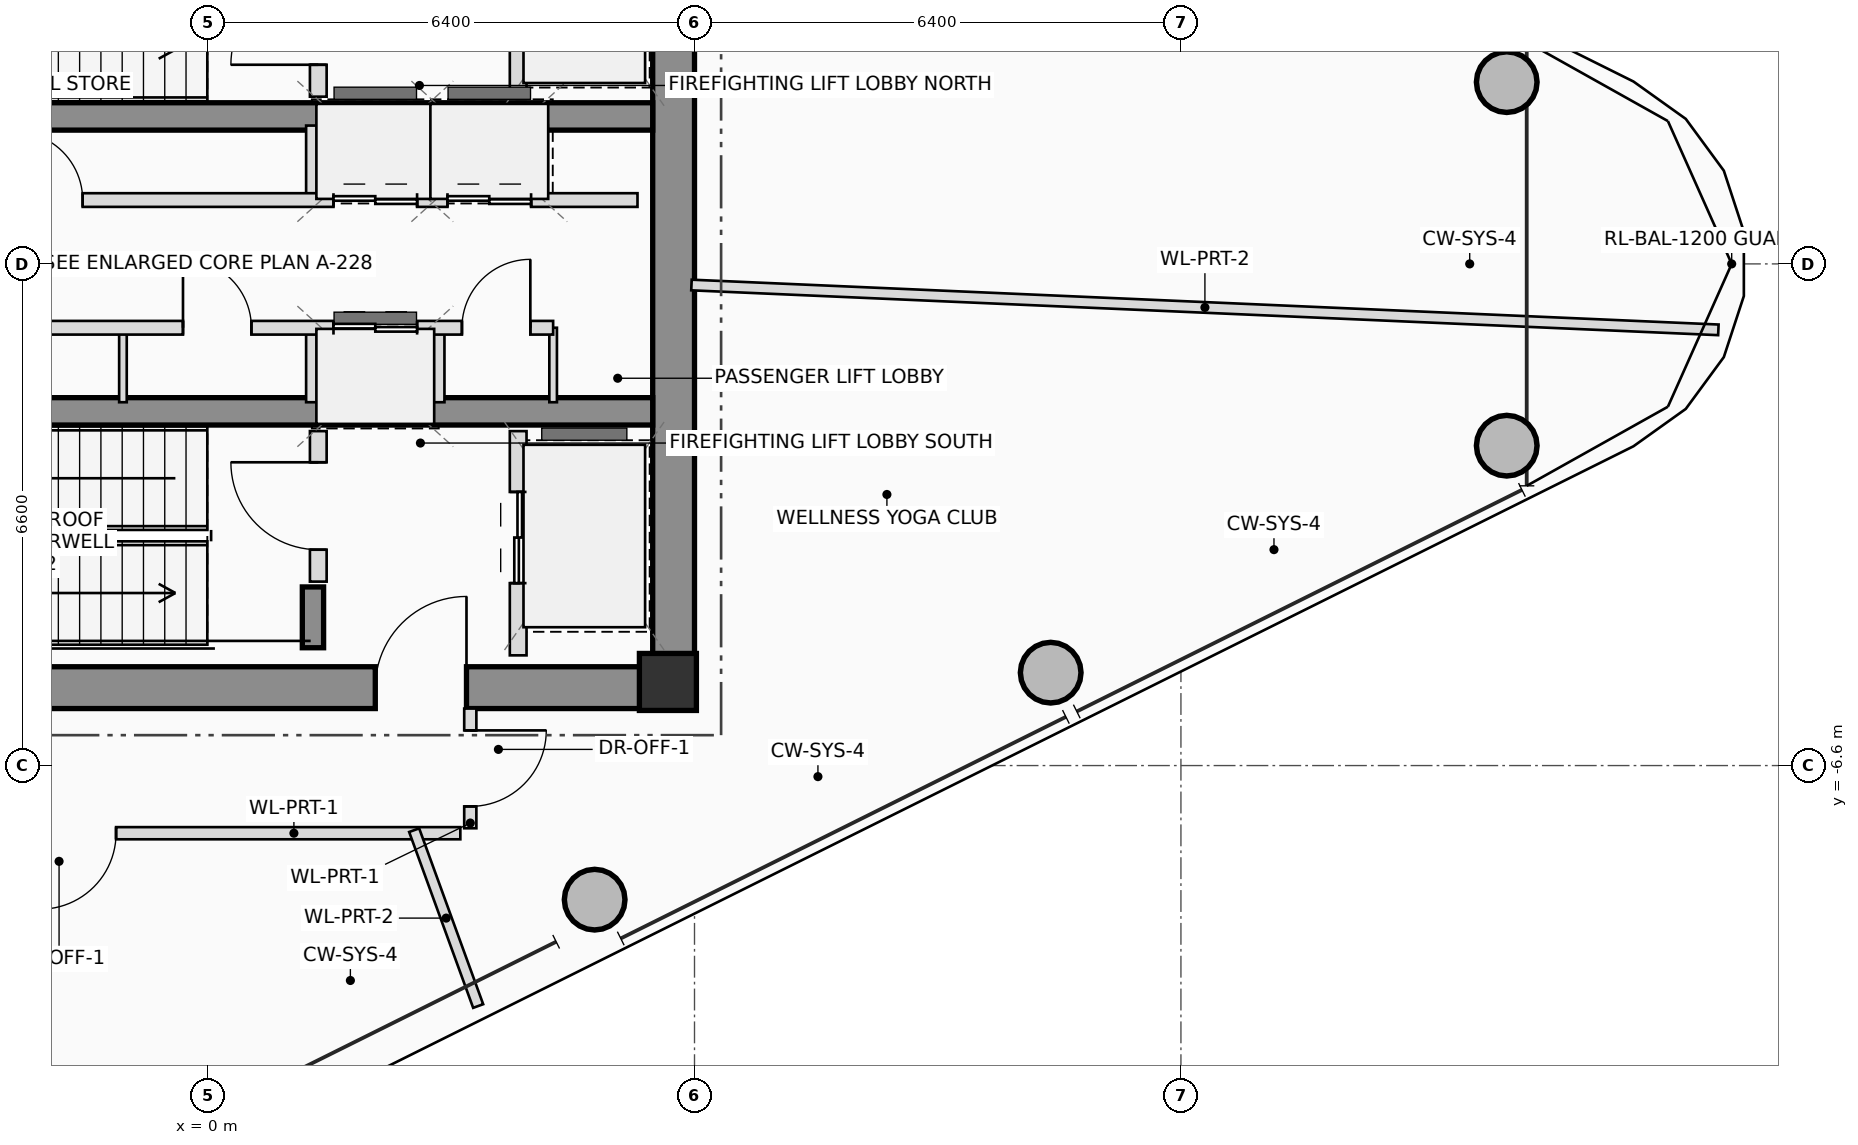
"""IFC4 building model, lengths in metres.
Left out: names, types, materials, properties, quantities, classifications, styles, units other than length and angle.
Written with IfcOpenShell. Run it as: python <this file> out.ifc"""

import sys

from ifc_helpers import new_model, si_unit, direction, frame, frame_2d, origin, origin_2d, place, context, subcontext, project, spatial, rectangle, hollow_circle, extrude, source, transform, mapped, element, fill, save


model = new_model("IFC4")
c1 = context("Model", 3, precision=1e-05, world=origin(), true_north=direction((0.0, 1.0)))
c2 = subcontext(c1, "Body", "Model", "MODEL_VIEW")
j1 = project(units=[si_unit("LENGTHUNIT", "METRE"), si_unit("PLANEANGLEUNIT", "RADIAN")], contexts=[c1])
p1 = place(None, origin())
s1 = spatial("IfcSite", under=j1, at=p1, CompositionType="ELEMENT")
p2 = place(p1, origin())
s2 = spatial("IfcBuilding", under=s1, at=p2, CompositionType="ELEMENT")
p3 = place(p2, frame((0.0, 0.0, 310.55)))
s3 = spatial("IfcBuildingStorey", under=s2, at=p3, CompositionType="ELEMENT", Elevation=310.55)
m1 = source(origin(), c2, "Body", "SweptSolid", [
    extrude(rectangle(XDim=0.75, YDim=0.75, at=origin_2d()), origin(), (0.0, 0.0, 1.0), 3.45),
])
p4 = place(p3, frame((6.05, -5.5, 0.0), z_axis=(0.0, 0.0, 1.0), x_axis=(1.0, 0.0, 0.0)))
e1 = element("IfcColumn", 1, at=p4, inside=s3, PredefinedType="COLUMN", context=c2, shape_type="MappedRepresentation", body=[
    mapped(m1, transform((0.0, 0.0, 0.0), scale=1.0)),
])
p5 = place(p3, frame((-6.4, -5.575, 0.0), z_axis=(0.0, 0.0, 1.0), x_axis=(1.0, 0.0, 0.0)))
e2 = element("IfcWall", 2, at=p5, inside=s3, PredefinedType="SHEAR", context=c2, shape_type="SweptSolid", body=[
    extrude(rectangle(XDim=12.8, YDim=0.55, at=frame_2d((6.4, 0.0))), origin(), (0.0, 0.0, 1.0), 3.45),
])
p6 = place(p5, frame((8.6, 0.0, 0.0)))
e3 = element("IfcOpeningElement", 3, at=p6, cuts=e2, PredefinedType="OPENING", context=c2, shape_type="SweptSolid", body=[
    extrude(rectangle(XDim=1.2, YDim=2.2, at=frame_2d((0.6, 1.1))), frame((0.0, 0.285, 0.0), z_axis=(0.0, -1.0, 0.0), x_axis=(1.0, 0.0, 0.0)), (0.0, 0.0, 1.0), 0.57),
])
p7 = place(p3, frame((6.125, -5.3, 0.0), z_axis=(0.0, 0.0, 1.0), x_axis=(0.0, 1.0, 0.0)))
e4 = element("IfcWall", 4, at=p7, inside=s3, PredefinedType="SHEAR", context=c2, shape_type="SweptSolid", body=[
    extrude(rectangle(XDim=10.6, YDim=0.55, at=frame_2d((5.3, 0.0))), origin(), (0.0, 0.0, 1.0), 3.45),
])
for number, where, z_axis, x_axis in (
    (5, (-5.85, 1.94, 0.0), (0.0, 0.0, 1.0), (1.0, 0.0, 0.0)),
    (6, (-5.85, -1.94, 0.0), (0.0, 0.0, 1.0), (1.0, 0.0, 0.0)),
):
    element("IfcWall", number, at=place(p3, frame(where, z_axis=z_axis, x_axis=x_axis)), inside=s3, PredefinedType="SHEAR", context=c2, shape_type="SweptSolid", body=[
        extrude(rectangle(XDim=11.7, YDim=0.36, at=frame_2d((5.85, 0.0))), origin(), (0.0, 0.0, 1.0), 3.45),
    ])
p8 = place(p3, frame((1.38, -5.05, 0.0), z_axis=(0.0, 0.0, 1.0), x_axis=(0.0, 1.0, 0.0)))
e7 = element("IfcWall", 7, at=p8, inside=s3, PredefinedType="SHEAR", context=c2, shape_type="SweptSolid", body=[
    extrude(rectangle(XDim=0.8, YDim=0.28, at=frame_2d((0.4, 0.0))), origin(), (0.0, 0.0, 1.0), 3.45),
])
m2 = source(origin(), c2, "Body", "SweptSolid", [
    extrude(hollow_circle(Radius=0.4, WallThickness=0.028, at=origin_2d()), origin(), (0.0, 0.0, 1.0), 3.45),
])
for number, where, z_axis, x_axis in (
    (8, (5.086, -8.364, 0.0), (0.0, 0.0, 1.0), (1.0, 0.0, 0.0)),
    (9, (11.086, -5.378, 0.0), (0.0, 0.0, 1.0), (1.0, 0.0, 0.0)),
    (10, (17.087, -2.392, 0.0), (0.0, 0.0, 1.0), (1.0, 0.0, 0.0)),
    (11, (17.087, 2.392, 0.0), (0.0, 0.0, 1.0), (1.0, 0.0, 0.0)),
):
    element("IfcColumn", number, at=place(p3, frame(where, z_axis=z_axis, x_axis=x_axis)), inside=s3, PredefinedType="COLUMN", context=c2, shape_type="MappedRepresentation", body=[
        mapped(m2, transform((0.0, 0.0, 0.0), scale=1.0)),
    ])
p9 = place(p3, frame((1.45, 2.2, 0.0), z_axis=(0.0, 0.0, 1.0), x_axis=(0.0, 1.0, 0.0)))
e12 = element("IfcWall", 12, at=p9, inside=s3, PredefinedType="PLUMBINGWALL", context=c2, shape_type="SweptSolid", body=[
    extrude(rectangle(XDim=1.98, YDim=0.22, at=frame_2d((0.99, 0.0))), origin(), (0.0, 0.0, 1.0), 3.25),
])
p10 = place(p9, frame((0.42, 0.0, 0.0)))
e13 = element("IfcOpeningElement", 13, at=p10, cuts=e12, PredefinedType="OPENING", context=c2, shape_type="SweptSolid", body=[
    extrude(rectangle(XDim=1.15, YDim=2.15, at=frame_2d((0.575, 1.075))), frame((0.0, 0.12, 0.0), z_axis=(0.0, -1.0, 0.0), x_axis=(1.0, 0.0, 0.0)), (0.0, 0.0, 1.0), 0.24),
])
p11 = place(p3, frame((4.08, 2.2, 0.0), z_axis=(0.0, 0.0, 1.0), x_axis=(0.0, 1.0, 0.0)))
e14 = element("IfcWall", 14, at=p11, inside=s3, PredefinedType="PLUMBINGWALL", context=c2, shape_type="SweptSolid", body=[
    extrude(rectangle(XDim=2.95, YDim=0.22, at=frame_2d((1.475, 0.0))), origin(), (0.0, 0.0, 1.0), 3.25),
])
p12 = place(p11, frame((0.75, 0.0, 0.0)))
e15 = element("IfcOpeningElement", 15, at=p12, cuts=e14, PredefinedType="OPENING", context=c2, shape_type="SweptSolid", body=[
    extrude(rectangle(XDim=1.2, YDim=2.25, at=frame_2d((0.6, 1.125))), frame((0.0, 0.12, 0.0), z_axis=(0.0, -1.0, 0.0), x_axis=(1.0, 0.0, 0.0)), (0.0, 0.0, 1.0), 0.24),
])
p13 = place(p3, frame((1.45, -4.18, 0.0), z_axis=(0.0, 0.0, 1.0), x_axis=(0.0, 1.0, 0.0)))
e16 = element("IfcWall", 16, at=p13, inside=s3, PredefinedType="PLUMBINGWALL", context=c2, shape_type="SweptSolid", body=[
    extrude(rectangle(XDim=1.98, YDim=0.22, at=frame_2d((0.99, 0.0))), origin(), (0.0, 0.0, 1.0), 3.25),
])
p14 = place(p13, frame((0.42, 0.0, 0.0)))
e17 = element("IfcOpeningElement", 17, at=p14, cuts=e16, PredefinedType="OPENING", context=c2, shape_type="SweptSolid", body=[
    extrude(rectangle(XDim=1.15, YDim=2.15, at=frame_2d((0.575, 1.075))), frame((0.0, 0.12, 0.0), z_axis=(0.0, -1.0, 0.0), x_axis=(1.0, 0.0, 0.0)), (0.0, 0.0, 1.0), 0.24),
])
p15 = place(p3, frame((4.08, -5.15, 0.0), z_axis=(0.0, 0.0, 1.0), x_axis=(0.0, 1.0, 0.0)))
e18 = element("IfcWall", 18, at=p15, inside=s3, PredefinedType="PLUMBINGWALL", context=c2, shape_type="SweptSolid", body=[
    extrude(rectangle(XDim=2.95, YDim=0.22, at=frame_2d((1.475, 0.0))), origin(), (0.0, 0.0, 1.0), 3.25),
])
p16 = place(p15, frame((0.95, 0.0, 0.0)))
e19 = element("IfcOpeningElement", 19, at=p16, cuts=e18, PredefinedType="OPENING", context=c2, shape_type="SweptSolid", body=[
    extrude(rectangle(XDim=1.2, YDim=2.25, at=frame_2d((0.6, 1.125))), frame((0.0, 0.12, 0.0), z_axis=(0.0, -1.0, 0.0), x_axis=(1.0, 0.0, 0.0)), (0.0, 0.0, 1.0), 0.24),
])
p17 = place(p3, frame((-1.12, -1.82, 0.0), z_axis=(0.0, 0.0, 1.0), x_axis=(0.0, 1.0, 0.0)))
e20 = element("IfcWall", 20, at=p17, inside=s3, PredefinedType="PARTITIONING", context=c2, shape_type="SweptSolid", body=[
    extrude(rectangle(XDim=0.98, YDim=0.1, at=frame_2d((0.49, 0.0))), origin(), (0.0, 0.0, 1.0), 3.25),
])
for number, where, z_axis, x_axis in (
    (21, (1.38, 0.84, 0.0), (0.0, 0.0, 1.0), (0.0, 1.0, 0.0)),
    (22, (1.38, -1.82, 0.0), (0.0, 0.0, 1.0), (0.0, 1.0, 0.0)),
    (23, (3.02, 0.84, 0.0), (0.0, 0.0, 1.0), (0.0, 1.0, 0.0)),
    (24, (4.38, 0.84, 0.0), (0.0, 0.0, 1.0), (0.0, 1.0, 0.0)),
    (25, (3.02, -1.82, 0.0), (0.0, 0.0, 1.0), (0.0, 1.0, 0.0)),
):
    element("IfcWall", number, at=place(p3, frame(where, z_axis=z_axis, x_axis=x_axis)), inside=s3, PredefinedType="PLUMBINGWALL", context=c2, shape_type="SweptSolid", body=[
        extrude(rectangle(XDim=0.98, YDim=0.18, at=frame_2d((0.49, 0.0))), origin(), (0.0, 0.0, 1.0), 3.25),
    ])
p18 = place(p3, frame((4.54, -1.82, 0.0), z_axis=(0.0, 0.0, 1.0), x_axis=(0.0, 1.0, 0.0)))
e26 = element("IfcWall", 26, at=p18, inside=s3, PredefinedType="PARTITIONING", context=c2, shape_type="SweptSolid", body=[
    extrude(rectangle(XDim=0.98, YDim=0.1, at=frame_2d((0.49, 0.0))), origin(), (0.0, 0.0, 1.0), 3.25),
])
p19 = place(p3, frame((-5.68, 0.84, 0.0), z_axis=(0.0, 0.0, 1.0), x_axis=(1.0, 0.0, 0.0)))
e27 = element("IfcWall", 27, at=p19, inside=s3, PredefinedType="PLUMBINGWALL", context=c2, shape_type="SweptSolid", body=[
    extrude(rectangle(XDim=11.33, YDim=0.18, at=frame_2d((5.665, 0.0))), origin(), (0.0, 0.0, 1.0), 3.25),
])
p20 = place(p19, frame((3.13, 0.0, 0.0)))
e28 = element("IfcOpeningElement", 28, at=p20, cuts=e27, PredefinedType="OPENING", context=c2, shape_type="SweptSolid", body=[
    extrude(rectangle(XDim=0.9, YDim=2.05, at=frame_2d((0.45, 1.025))), frame((0.0, 0.1, 0.0), z_axis=(0.0, -1.0, 0.0), x_axis=(1.0, 0.0, 0.0)), (0.0, 0.0, 1.0), 0.2),
])
p21 = place(p19, frame((7.33, 0.0, 0.0)))
e29 = element("IfcOpeningElement", 29, at=p21, cuts=e27, PredefinedType="OPENING", context=c2, shape_type="SweptSolid", body=[
    extrude(rectangle(XDim=1.1, YDim=2.2, at=frame_2d((0.55, 1.1))), frame((0.0, 0.1, 0.0), z_axis=(0.0, -1.0, 0.0), x_axis=(1.0, 0.0, 0.0)), (0.0, 0.0, 1.0), 0.2),
])
p22 = place(p19, frame((8.83, 0.0, 0.0)))
e30 = element("IfcOpeningElement", 30, at=p22, cuts=e27, PredefinedType="OPENING", context=c2, shape_type="SweptSolid", body=[
    extrude(rectangle(XDim=1.1, YDim=2.2, at=frame_2d((0.55, 1.1))), frame((0.0, 0.1, 0.0), z_axis=(0.0, -1.0, 0.0), x_axis=(1.0, 0.0, 0.0)), (0.0, 0.0, 1.0), 0.2),
])
p23 = place(p3, frame((-5.68, -0.84, 0.0), z_axis=(0.0, 0.0, 1.0), x_axis=(1.0, 0.0, 0.0)))
e31 = element("IfcWall", 31, at=p23, inside=s3, PredefinedType="PLUMBINGWALL", context=c2, shape_type="SweptSolid", body=[
    extrude(rectangle(XDim=10.22, YDim=0.18, at=frame_2d((5.11, 0.0))), origin(), (0.0, 0.0, 1.0), 3.25),
])
p24 = place(p23, frame((1.88, 0.0, 0.0)))
e32 = element("IfcOpeningElement", 32, at=p24, cuts=e31, PredefinedType="OPENING", context=c2, shape_type="SweptSolid", body=[
    extrude(rectangle(XDim=0.9, YDim=2.05, at=frame_2d((0.45, 1.025))), frame((0.0, 0.1, 0.0), z_axis=(0.0, -1.0, 0.0), x_axis=(1.0, 0.0, 0.0)), (0.0, 0.0, 1.0), 0.2),
])
p25 = place(p23, frame((5.35, 0.0, 0.0)))
e33 = element("IfcOpeningElement", 33, at=p25, cuts=e31, PredefinedType="OPENING", context=c2, shape_type="SweptSolid", body=[
    extrude(rectangle(XDim=0.9, YDim=2.05, at=frame_2d((0.45, 1.025))), frame((0.0, 0.1, 0.0), z_axis=(0.0, -1.0, 0.0), x_axis=(1.0, 0.0, 0.0)), (0.0, 0.0, 1.0), 0.2),
])
p26 = place(p23, frame((7.33, 0.0, 0.0)))
e34 = element("IfcOpeningElement", 34, at=p26, cuts=e31, PredefinedType="OPENING", context=c2, shape_type="SweptSolid", body=[
    extrude(rectangle(XDim=1.1, YDim=2.2, at=frame_2d((0.55, 1.1))), frame((0.0, 0.1, 0.0), z_axis=(0.0, -1.0, 0.0), x_axis=(1.0, 0.0, 0.0)), (0.0, 0.0, 1.0), 0.2),
])
p27 = place(p23, frame((9.02, 0.0, 0.0)))
e35 = element("IfcOpeningElement", 35, at=p27, cuts=e31, PredefinedType="OPENING", context=c2, shape_type="SweptSolid", body=[
    extrude(rectangle(XDim=0.9, YDim=2.05, at=frame_2d((0.45, 1.025))), frame((0.0, 0.1, 0.0), z_axis=(0.0, -1.0, 0.0), x_axis=(1.0, 0.0, 0.0)), (0.0, 0.0, 1.0), 0.2),
])
p28 = place(p3, frame((3.45, -5.85, 0.0), z_axis=(0.0, 0.0, 1.0), x_axis=(0.0, -1.0, 0.0)))
e36 = element("IfcWall", 36, at=p28, inside=s3, PredefinedType="PARTITIONING", context=c2, shape_type="SweptSolid", body=[
    extrude(rectangle(XDim=1.575, YDim=0.16, at=frame_2d((0.787, 0.0))), origin(), (0.0, 0.0, 1.0), 2.855),
])
p29 = place(p28, frame((0.287, 0.0, 0.0)))
e37 = element("IfcOpeningElement", 37, at=p29, cuts=e36, PredefinedType="OPENING", context=c2, shape_type="SweptSolid", body=[
    extrude(rectangle(XDim=1.0, YDim=2.25, at=frame_2d((0.5, 1.125))), frame((0.0, 0.09, 0.0), z_axis=(0.0, -1.0, 0.0), x_axis=(1.0, 0.0, 0.0)), (0.0, 0.0, 1.0), 0.18),
])
p30 = place(p3, frame((3.319, -7.49, 0.0), z_axis=(0.0, 0.0, 1.0), x_axis=(-1.0, 0.0, 0.0)))
e38 = element("IfcWall", 38, at=p30, inside=s3, PredefinedType="PARTITIONING", context=c2, shape_type="SweptSolid", body=[
    extrude(rectangle(XDim=9.679, YDim=0.16, at=frame_2d((4.84, 0.0))), origin(), (0.0, 0.0, 1.0), 2.655),
])
p31 = place(p30, frame((4.53, 0.0, 0.0)))
e39 = element("IfcOpeningElement", 39, at=p31, cuts=e38, PredefinedType="OPENING", context=c2, shape_type="SweptSolid", body=[
    extrude(rectangle(XDim=1.0, YDim=2.25, at=frame_2d((0.5, 1.125))), frame((0.0, 0.09, 0.0), z_axis=(0.0, -1.0, 0.0), x_axis=(1.0, 0.0, 0.0)), (0.0, 0.0, 1.0), 0.18),
])
p32 = place(p3, frame((6.36, -0.278, 0.0), z_axis=(0.0, 0.0, 1.0), x_axis=(0.999047623791, -0.043633076864, 0.0)))
e40 = element("IfcWall", 40, at=p32, inside=s3, PredefinedType="PARTITIONING", context=c2, shape_type="SweptSolid", body=[
    extrude(rectangle(XDim=13.524, YDim=0.14, at=frame_2d((6.762, 0.0))), origin(), (0.0, 0.0, 1.0), 2.815),
])
p33 = place(p3, frame((2.712, -7.45, 0.0), z_axis=(0.0, 0.0, 1.0), x_axis=(0.341989856239, -0.939703643831, 0.0)))
e41 = element("IfcWall", 41, at=p33, inside=s3, PredefinedType="PARTITIONING", context=c2, shape_type="SweptSolid", body=[
    extrude(rectangle(XDim=2.462, YDim=0.14, at=frame_2d((1.231, 0.0))), origin(), (0.0, 0.0, 1.0), 2.815),
])
p34 = place(p6, origin())
e42 = element("IfcDoor", 42, at=p34, inside=s3, OperationType="SINGLE_SWING_RIGHT", PredefinedType="DOOR", context=c2, shape_type="SweptSolid", body=[
    extrude(rectangle(XDim=1.2, YDim=2.2, at=frame_2d((0.6, 1.1))), frame((0.0, 0.025, 0.0), z_axis=(0.0, -1.0, 0.0), x_axis=(1.0, 0.0, 0.0)), (0.0, 0.0, 1.0), 0.05),
])
fill(e3, e42)
p35 = place(p10, origin())
e43 = element("IfcDoor", 43, at=p35, inside=s3, OperationType="SINGLE_SWING_LEFT", PredefinedType="DOOR", context=c2, shape_type="SweptSolid", body=[
    extrude(rectangle(XDim=1.15, YDim=2.15, at=frame_2d((0.575, 1.075))), frame((0.0, 0.025, 0.0), z_axis=(0.0, -1.0, 0.0), x_axis=(1.0, 0.0, 0.0)), (0.0, 0.0, 1.0), 0.05),
])
fill(e13, e43)
p36 = place(p14, origin())
e44 = element("IfcDoor", 44, at=p36, inside=s3, OperationType="SINGLE_SWING_RIGHT", PredefinedType="DOOR", context=c2, shape_type="SweptSolid", body=[
    extrude(rectangle(XDim=1.15, YDim=2.15, at=frame_2d((0.575, 1.075))), frame((0.0, 0.025, 0.0), z_axis=(0.0, -1.0, 0.0), x_axis=(1.0, 0.0, 0.0)), (0.0, 0.0, 1.0), 0.05),
])
fill(e17, e44)
p37 = place(p16, origin())
e45 = element("IfcDoor", 45, at=p37, inside=s3, OperationType="DOUBLE_DOOR_SLIDING", PredefinedType="DOOR", context=c2, shape_type="SweptSolid", body=[
    extrude(rectangle(XDim=1.2, YDim=2.25, at=frame_2d((0.6, 1.125))), frame((0.0, 0.025, 0.0), z_axis=(0.0, -1.0, 0.0), x_axis=(1.0, 0.0, 0.0)), (0.0, 0.0, 1.0), 0.05),
])
fill(e19, e45)
p38 = place(p20, origin())
e46 = element("IfcDoor", 46, at=p38, inside=s3, OperationType="SINGLE_SWING_LEFT", PredefinedType="DOOR", context=c2, shape_type="SweptSolid", body=[
    extrude(rectangle(XDim=0.9, YDim=2.05, at=frame_2d((0.45, 1.025))), frame((0.0, 0.025, 0.0), z_axis=(0.0, -1.0, 0.0), x_axis=(1.0, 0.0, 0.0)), (0.0, 0.0, 1.0), 0.05),
])
fill(e28, e46)
p39 = place(p21, origin())
e47 = element("IfcDoor", 47, at=p39, inside=s3, OperationType="DOUBLE_DOOR_SLIDING", PredefinedType="DOOR", context=c2, shape_type="SweptSolid", body=[
    extrude(rectangle(XDim=1.1, YDim=2.2, at=frame_2d((0.55, 1.1))), frame((0.0, 0.025, 0.0), z_axis=(0.0, -1.0, 0.0), x_axis=(1.0, 0.0, 0.0)), (0.0, 0.0, 1.0), 0.05),
])
fill(e29, e47)
p40 = place(p22, origin())
e48 = element("IfcDoor", 48, at=p40, inside=s3, OperationType="DOUBLE_DOOR_SLIDING", PredefinedType="DOOR", context=c2, shape_type="SweptSolid", body=[
    extrude(rectangle(XDim=1.1, YDim=2.2, at=frame_2d((0.55, 1.1))), frame((0.0, 0.025, 0.0), z_axis=(0.0, -1.0, 0.0), x_axis=(1.0, 0.0, 0.0)), (0.0, 0.0, 1.0), 0.05),
])
fill(e30, e48)
p41 = place(p25, origin())
e49 = element("IfcDoor", 49, at=p41, inside=s3, OperationType="SINGLE_SWING_LEFT", PredefinedType="DOOR", context=c2, shape_type="SweptSolid", body=[
    extrude(rectangle(XDim=0.9, YDim=2.05, at=frame_2d((0.45, 1.025))), frame((0.0, 0.025, 0.0), z_axis=(0.0, -1.0, 0.0), x_axis=(1.0, 0.0, 0.0)), (0.0, 0.0, 1.0), 0.05),
])
fill(e33, e49)
p42 = place(p26, origin())
e50 = element("IfcDoor", 50, at=p42, inside=s3, OperationType="DOUBLE_DOOR_SLIDING", PredefinedType="DOOR", context=c2, shape_type="SweptSolid", body=[
    extrude(rectangle(XDim=1.1, YDim=2.2, at=frame_2d((0.55, 1.1))), frame((0.0, 0.025, 0.0), z_axis=(0.0, -1.0, 0.0), x_axis=(1.0, 0.0, 0.0)), (0.0, 0.0, 1.0), 0.05),
])
fill(e34, e50)
p43 = place(p27, origin())
e51 = element("IfcDoor", 51, at=p43, inside=s3, OperationType="SINGLE_SWING_RIGHT", PredefinedType="DOOR", context=c2, shape_type="SweptSolid", body=[
    extrude(rectangle(XDim=0.9, YDim=2.05, at=frame_2d((0.45, 1.025))), frame((0.0, 0.025, 0.0), z_axis=(0.0, -1.0, 0.0), x_axis=(1.0, 0.0, 0.0)), (0.0, 0.0, 1.0), 0.05),
])
fill(e35, e51)
p44 = place(p29, origin())
e52 = element("IfcDoor", 52, at=p44, inside=s3, OperationType="SINGLE_SWING_LEFT", PredefinedType="DOOR", context=c2, shape_type="SweptSolid", body=[
    extrude(rectangle(XDim=1.0, YDim=2.25, at=frame_2d((0.5, 1.125))), frame((0.0, 0.025, 0.0), z_axis=(0.0, -1.0, 0.0), x_axis=(1.0, 0.0, 0.0)), (0.0, 0.0, 1.0), 0.05),
])
fill(e37, e52)
p45 = place(p31, origin())
e53 = element("IfcDoor", 53, at=p45, inside=s3, OperationType="SINGLE_SWING_RIGHT", PredefinedType="DOOR", context=c2, shape_type="SweptSolid", body=[
    extrude(rectangle(XDim=1.0, YDim=2.25, at=frame_2d((0.5, 1.125))), frame((0.0, 0.025, 0.0), z_axis=(0.0, -1.0, 0.0), x_axis=(1.0, 0.0, 0.0)), (0.0, 0.0, 1.0), 0.05),
])
fill(e39, e53)
save(model, sys.argv[1])
